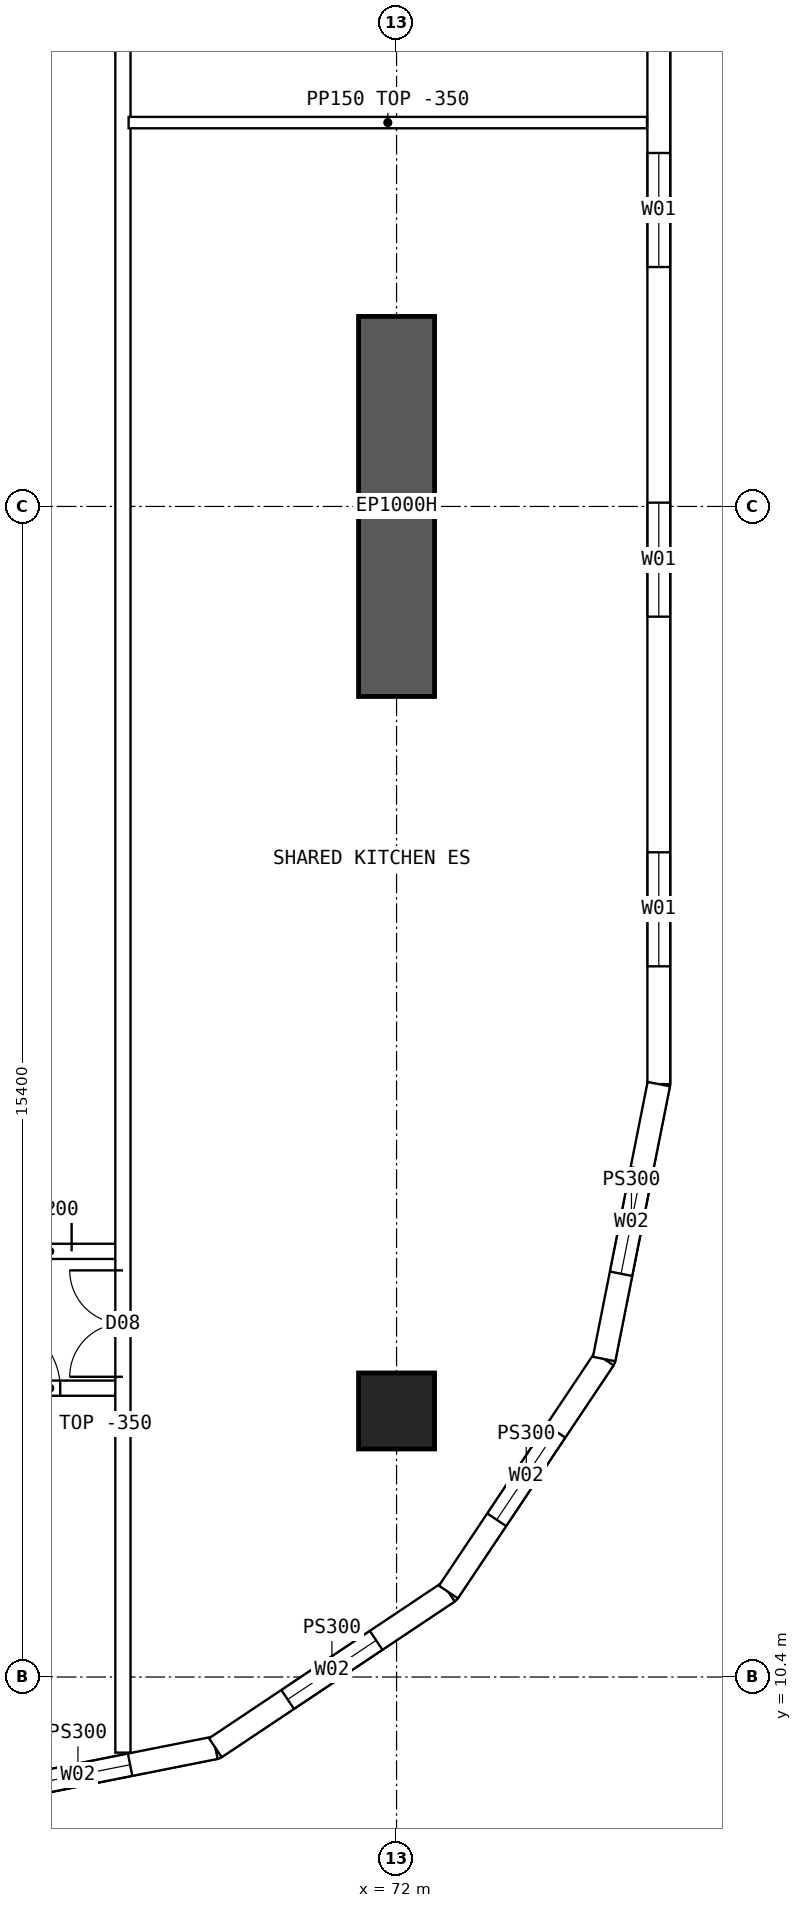
"""IFC4 building model, lengths in metres.
Left out: names, types, materials, properties, quantities, classifications, styles, units other than length and angle.
Written with IfcOpenShell. Run it as: python <this file> out.ifc"""

import sys

from ifc_helpers import new_model, si_unit, direction, frame, frame_2d, origin, origin_2d, place, context, subcontext, project, spatial, polyline, rectangle, hollow_rectangle, outline, extrude, element, fill, save


model = new_model("IFC4")
c1 = context("Model", 3, precision=1e-05, world=origin(), true_north=direction((0.0, 1.0)))
c2 = subcontext(c1, "Body", "Model", "MODEL_VIEW")
j1 = project(units=[si_unit("LENGTHUNIT", "METRE"), si_unit("PLANEANGLEUNIT", "RADIAN")], contexts=[c1])
p1 = place(None, origin())
s1 = spatial("IfcSite", under=j1, at=p1, CompositionType="ELEMENT")
p2 = place(p1, origin())
s2 = spatial("IfcBuilding", under=s1, at=p2, CompositionType="ELEMENT")
p3 = place(p2, frame((0.0, 0.0, 129.4)))
s3 = spatial("IfcBuildingStorey", under=s2, at=p3, CompositionType="ELEMENT", Elevation=129.4)
p4 = place(p3, frame((72.0, 13.9, 0.0), z_axis=(0.0, 0.0, 1.0), x_axis=(1.0, 0.0, 0.0)))
e1 = element("IfcColumn", 1, at=p4, inside=s3, PredefinedType="COLUMN", context=c2, shape_type="SweptSolid", body=[
    extrude(hollow_rectangle(XDim=1.0, YDim=1.0, WallThickness=0.1, at=origin_2d()), origin(), (0.0, 0.0, 1.0), 3.75),
])
p5 = place(p3, frame((72.0, 23.3, 0.0), z_axis=(0.0, 0.0, 1.0), x_axis=(0.0, 1.0, 0.0)))
e2 = element("IfcWall", 2, at=p5, inside=s3, PredefinedType="SHEAR", context=c2, shape_type="SweptSolid", body=[
    extrude(rectangle(XDim=5.0, YDim=1.0, at=frame_2d((2.5, 0.0))), origin(), (0.0, 0.0, 1.0), 3.75),
])
p6 = place(p3, frame((75.45, 18.2, 0.0), z_axis=(0.0, 0.0, 1.0), x_axis=(0.0, 1.0, 0.0)))
e3 = element("IfcWall", 3, at=p6, inside=s3, PredefinedType="SOLIDWALL", context=c2, shape_type="SweptSolid", body=[
    extrude(outline(polyline([(-0.015, -0.15), (27.615, -0.15), (27.585, 0.15), (0.015, 0.15), (-0.015, -0.15)])), origin(), (0.0, 0.0, 1.0), 3.4),
])
p7 = place(p6, frame((1.55, 0.0, 0.9)))
e4 = element("IfcOpeningElement", 4, at=p7, cuts=e3, PredefinedType="OPENING", context=c2, shape_type="SweptSolid", body=[
    extrude(rectangle(XDim=1.5, YDim=2.0, at=frame_2d((0.75, 1.0))), frame((0.0, 0.16, 0.0), z_axis=(0.0, -1.0, 0.0), x_axis=(1.0, 0.0, 0.0)), (0.0, 0.0, 1.0), 0.32),
])
p8 = place(p6, frame((6.15, 0.0, 0.9)))
e5 = element("IfcOpeningElement", 5, at=p8, cuts=e3, PredefinedType="OPENING", context=c2, shape_type="SweptSolid", body=[
    extrude(rectangle(XDim=1.5, YDim=2.0, at=frame_2d((0.75, 1.0))), frame((0.0, 0.16, 0.0), z_axis=(0.0, -1.0, 0.0), x_axis=(1.0, 0.0, 0.0)), (0.0, 0.0, 1.0), 0.32),
])
p9 = place(p6, frame((10.75, 0.0, 0.9)))
e6 = element("IfcOpeningElement", 6, at=p9, cuts=e3, PredefinedType="OPENING", context=c2, shape_type="SweptSolid", body=[
    extrude(rectangle(XDim=1.5, YDim=2.0, at=frame_2d((0.75, 1.0))), frame((0.0, 0.16, 0.0), z_axis=(0.0, -1.0, 0.0), x_axis=(1.0, 0.0, 0.0)), (0.0, 0.0, 1.0), 0.32),
])
p10 = place(p6, frame((15.35, 0.0, 0.9)))
e7 = element("IfcOpeningElement", 7, at=p10, cuts=e3, PredefinedType="OPENING", context=c2, shape_type="SweptSolid", body=[
    extrude(rectangle(XDim=1.5, YDim=2.0, at=frame_2d((0.75, 1.0))), frame((0.0, 0.16, 0.0), z_axis=(0.0, -1.0, 0.0), x_axis=(1.0, 0.0, 0.0)), (0.0, 0.0, 1.0), 0.32),
])
p11 = place(p6, frame((19.95, 0.0, 0.9)))
e8 = element("IfcOpeningElement", 8, at=p11, cuts=e3, PredefinedType="OPENING", context=c2, shape_type="SweptSolid", body=[
    extrude(rectangle(XDim=1.5, YDim=2.0, at=frame_2d((0.75, 1.0))), frame((0.0, 0.16, 0.0), z_axis=(0.0, -1.0, 0.0), x_axis=(1.0, 0.0, 0.0)), (0.0, 0.0, 1.0), 0.32),
])
p12 = place(p6, frame((24.55, 0.0, 0.9)))
e9 = element("IfcOpeningElement", 9, at=p12, cuts=e3, PredefinedType="OPENING", context=c2, shape_type="SweptSolid", body=[
    extrude(rectangle(XDim=1.5, YDim=2.0, at=frame_2d((0.75, 1.0))), frame((0.0, 0.16, 0.0), z_axis=(0.0, -1.0, 0.0), x_axis=(1.0, 0.0, 0.0)), (0.0, 0.0, 1.0), 0.32),
])
p13 = place(p3, frame((66.0, 8.75, 0.0), z_axis=(0.0, 0.0, 1.0), x_axis=(0.980791473772, 0.195059183267, 0.0)))
e10 = element("IfcWall", 10, at=p13, inside=s3, PredefinedType="SOLIDWALL", context=c2, shape_type="SweptSolid", body=[
    extrude(outline(polyline([(-0.03, -0.15), (3.717, -0.15), (3.657, 0.15), (0.03, 0.15), (-0.03, -0.15)])), origin(), (0.0, 0.0, 1.0), 3.4),
])
p14 = place(p13, frame((1.144, 0.0, 0.9)))
e11 = element("IfcOpeningElement", 11, at=p14, cuts=e10, PredefinedType="OPENING", context=c2, shape_type="SweptSolid", body=[
    extrude(rectangle(XDim=1.4, YDim=1.8, at=frame_2d((0.7, 0.9))), frame((0.0, 0.16, 0.0), z_axis=(0.0, -1.0, 0.0), x_axis=(1.0, 0.0, 0.0)), (0.0, 0.0, 1.0), 0.32),
])
p15 = place(p3, frame((69.616, 9.469, 0.0), z_axis=(0.0, 0.0, 1.0), x_axis=(0.831448786846, 0.555601399253, 0.0)))
e12 = element("IfcWall", 12, at=p15, inside=s3, PredefinedType="SOLIDWALL", context=c2, shape_type="SweptSolid", body=[
    extrude(outline(polyline([(-0.03, -0.15), (3.717, -0.15), (3.657, 0.15), (0.03, 0.15), (-0.03, -0.15)])), origin(), (0.0, 0.0, 1.0), 3.4),
])
p16 = place(p15, frame((1.144, 0.0, 0.9)))
e13 = element("IfcOpeningElement", 13, at=p16, cuts=e12, PredefinedType="OPENING", context=c2, shape_type="SweptSolid", body=[
    extrude(rectangle(XDim=1.4, YDim=1.8, at=frame_2d((0.7, 0.9))), frame((0.0, 0.16, 0.0), z_axis=(0.0, -1.0, 0.0), x_axis=(1.0, 0.0, 0.0)), (0.0, 0.0, 1.0), 0.32),
])
p17 = place(p3, frame((72.682, 11.518, 0.0), z_axis=(0.0, 0.0, 1.0), x_axis=(0.555601399253, 0.831448786846, 0.0)))
e14 = element("IfcWall", 14, at=p17, inside=s3, PredefinedType="SOLIDWALL", context=c2, shape_type="SweptSolid", body=[
    extrude(outline(polyline([(-0.03, -0.15), (3.717, -0.15), (3.657, 0.15), (0.03, 0.15), (-0.03, -0.15)])), origin(), (0.0, 0.0, 1.0), 3.4),
])
p18 = place(p17, frame((1.144, 0.0, 0.9)))
e15 = element("IfcOpeningElement", 15, at=p18, cuts=e14, PredefinedType="OPENING", context=c2, shape_type="SweptSolid", body=[
    extrude(rectangle(XDim=1.4, YDim=1.8, at=frame_2d((0.7, 0.9))), frame((0.0, 0.16, 0.0), z_axis=(0.0, -1.0, 0.0), x_axis=(1.0, 0.0, 0.0)), (0.0, 0.0, 1.0), 0.32),
])
p19 = place(p3, frame((74.731, 14.583, 0.0), z_axis=(0.0, 0.0, 1.0), x_axis=(0.195059183267, 0.980791473772, 0.0)))
e16 = element("IfcWall", 16, at=p19, inside=s3, PredefinedType="SOLIDWALL", context=c2, shape_type="SweptSolid", body=[
    extrude(outline(polyline([(-0.03, -0.15), (3.702, -0.15), (3.672, 0.15), (0.03, 0.15), (-0.03, -0.15)])), origin(), (0.0, 0.0, 1.0), 3.4),
])
p20 = place(p19, frame((1.144, 0.0, 0.9)))
e17 = element("IfcOpeningElement", 17, at=p20, cuts=e16, PredefinedType="OPENING", context=c2, shape_type="SweptSolid", body=[
    extrude(rectangle(XDim=1.4, YDim=1.8, at=frame_2d((0.7, 0.9))), frame((0.0, 0.16, 0.0), z_axis=(0.0, -1.0, 0.0), x_axis=(1.0, 0.0, 0.0)), (0.0, 0.0, 1.0), 0.32),
])
p21 = place(p3, frame((66.475, 14.2, 0.0), z_axis=(0.0, 0.0, 1.0), x_axis=(1.0, 0.0, 0.0)))
e18 = element("IfcWall", 18, at=p21, inside=s3, PredefinedType="SOLIDWALL", context=c2, shape_type="SweptSolid", body=[
    extrude(rectangle(XDim=1.925, YDim=0.2, at=frame_2d((0.962, 0.0))), origin(), (0.0, 0.0, 1.0), 3.4),
])
p22 = place(p21, frame((0.2, 0.0, 0.0)))
e19 = element("IfcOpeningElement", 19, at=p22, cuts=e18, PredefinedType="OPENING", context=c2, shape_type="SweptSolid", body=[
    extrude(rectangle(XDim=0.9, YDim=2.1, at=frame_2d((0.45, 1.05))), frame((0.0, 0.11, 0.0), z_axis=(0.0, -1.0, 0.0), x_axis=(1.0, 0.0, 0.0)), (0.0, 0.0, 1.0), 0.22),
])
p23 = place(p3, frame((66.475, 16.0, 0.0), z_axis=(0.0, 0.0, 1.0), x_axis=(1.0, 0.0, 0.0)))
e20 = element("IfcWall", 20, at=p23, inside=s3, PredefinedType="SOLIDWALL", context=c2, shape_type="SweptSolid", body=[
    extrude(rectangle(XDim=1.925, YDim=0.2, at=frame_2d((0.962, 0.0))), origin(), (0.0, 0.0, 1.0), 3.4),
])
p24 = place(p23, frame((0.05, 0.0, 0.0)))
e21 = element("IfcOpeningElement", 21, at=p24, cuts=e20, PredefinedType="OPENING", context=c2, shape_type="SweptSolid", body=[
    extrude(rectangle(XDim=1.2, YDim=2.1, at=frame_2d((0.6, 1.05))), frame((0.0, 0.11, 0.0), z_axis=(0.0, -1.0, 0.0), x_axis=(1.0, 0.0, 0.0)), (0.0, 0.0, 1.0), 0.22),
])
p25 = place(p3, frame((68.475, 30.85, 0.0), z_axis=(0.0, 0.0, 1.0), x_axis=(1.0, 0.0, 0.0)))
e22 = element("IfcWall", 22, at=p25, inside=s3, PredefinedType="PARTITIONING", context=c2, shape_type="SweptSolid", body=[
    extrude(outline(polyline([(0.0, 0.0), (6.82, 0.0), (6.82, 3.4), (3.827, 3.4), (3.825, 2.95), (3.227, 2.95), (3.225, 3.4), (0.0, 3.4), (0.0, 0.0)])), frame((0.0, 0.075, 0.0), z_axis=(0.0, -1.0, 0.0), x_axis=(1.0, 0.0, 0.0)), (0.0, 0.0, 1.0), 0.15),
])
p26 = place(p3, frame((68.4, 9.405, 0.0), z_axis=(0.0, 0.0, 1.0), x_axis=(0.0, 1.0, 0.0)))
e23 = element("IfcWall", 23, at=p26, inside=s3, PredefinedType="SOLIDWALL", context=c2, shape_type="SweptSolid", body=[
    extrude(rectangle(XDim=45.189, YDim=0.2, at=frame_2d((22.595, 0.0))), origin(), (0.0, 0.0, 1.0), 3.4),
])
p27 = place(p26, frame((4.945, 0.0, 0.0)))
e24 = element("IfcOpeningElement", 24, at=p27, cuts=e23, PredefinedType="OPENING", context=c2, shape_type="SweptSolid", body=[
    extrude(rectangle(XDim=1.4, YDim=2.1, at=frame_2d((0.7, 1.05))), frame((0.0, 0.11, 0.0), z_axis=(0.0, -1.0, 0.0), x_axis=(1.0, 0.0, 0.0)), (0.0, 0.0, 1.0), 0.22),
])
p28 = place(p26, frame((38.745, 0.0, 0.0)))
e25 = element("IfcOpeningElement", 25, at=p28, cuts=e23, PredefinedType="OPENING", context=c2, shape_type="SweptSolid", body=[
    extrude(rectangle(XDim=1.4, YDim=2.1, at=frame_2d((0.7, 1.05))), frame((0.0, 0.11, 0.0), z_axis=(0.0, -1.0, 0.0), x_axis=(1.0, 0.0, 0.0)), (0.0, 0.0, 1.0), 0.22),
])
p29 = place(p7, origin())
e26 = element("IfcWindow", 26, at=p29, inside=s3, PartitioningType="SINGLE_PANEL", PredefinedType="WINDOW", context=c2, shape_type="SweptSolid", body=[
    extrude(rectangle(XDim=1.5, YDim=2.0, at=frame_2d((0.75, 1.0))), frame((0.0, 0.03, 0.0), z_axis=(0.0, -1.0, 0.0), x_axis=(1.0, 0.0, 0.0)), (0.0, 0.0, 1.0), 0.06),
])
fill(e4, e26)
p30 = place(p8, origin())
e27 = element("IfcWindow", 27, at=p30, inside=s3, PartitioningType="SINGLE_PANEL", PredefinedType="WINDOW", context=c2, shape_type="SweptSolid", body=[
    extrude(rectangle(XDim=1.5, YDim=2.0, at=frame_2d((0.75, 1.0))), frame((0.0, 0.03, 0.0), z_axis=(0.0, -1.0, 0.0), x_axis=(1.0, 0.0, 0.0)), (0.0, 0.0, 1.0), 0.06),
])
fill(e5, e27)
p31 = place(p9, origin())
e28 = element("IfcWindow", 28, at=p31, inside=s3, PartitioningType="SINGLE_PANEL", PredefinedType="WINDOW", context=c2, shape_type="SweptSolid", body=[
    extrude(rectangle(XDim=1.5, YDim=2.0, at=frame_2d((0.75, 1.0))), frame((0.0, 0.03, 0.0), z_axis=(0.0, -1.0, 0.0), x_axis=(1.0, 0.0, 0.0)), (0.0, 0.0, 1.0), 0.06),
])
fill(e6, e28)
p32 = place(p14, origin())
e29 = element("IfcWindow", 29, at=p32, inside=s3, PartitioningType="SINGLE_PANEL", PredefinedType="WINDOW", context=c2, shape_type="SweptSolid", body=[
    extrude(rectangle(XDim=1.4, YDim=1.8, at=frame_2d((0.7, 0.9))), frame((0.0, 0.03, 0.0), z_axis=(0.0, -1.0, 0.0), x_axis=(1.0, 0.0, 0.0)), (0.0, 0.0, 1.0), 0.06),
])
fill(e11, e29)
p33 = place(p16, origin())
e30 = element("IfcWindow", 30, at=p33, inside=s3, PartitioningType="SINGLE_PANEL", PredefinedType="WINDOW", context=c2, shape_type="SweptSolid", body=[
    extrude(rectangle(XDim=1.4, YDim=1.8, at=frame_2d((0.7, 0.9))), frame((0.0, 0.03, 0.0), z_axis=(0.0, -1.0, 0.0), x_axis=(1.0, 0.0, 0.0)), (0.0, 0.0, 1.0), 0.06),
])
fill(e13, e30)
p34 = place(p18, origin())
e31 = element("IfcWindow", 31, at=p34, inside=s3, PartitioningType="SINGLE_PANEL", PredefinedType="WINDOW", context=c2, shape_type="SweptSolid", body=[
    extrude(rectangle(XDim=1.4, YDim=1.8, at=frame_2d((0.7, 0.9))), frame((0.0, 0.03, 0.0), z_axis=(0.0, -1.0, 0.0), x_axis=(1.0, 0.0, 0.0)), (0.0, 0.0, 1.0), 0.06),
])
fill(e15, e31)
p35 = place(p20, origin())
e32 = element("IfcWindow", 32, at=p35, inside=s3, PartitioningType="SINGLE_PANEL", PredefinedType="WINDOW", context=c2, shape_type="SweptSolid", body=[
    extrude(rectangle(XDim=1.4, YDim=1.8, at=frame_2d((0.7, 0.9))), frame((0.0, 0.03, 0.0), z_axis=(0.0, -1.0, 0.0), x_axis=(1.0, 0.0, 0.0)), (0.0, 0.0, 1.0), 0.06),
])
fill(e17, e32)
p36 = place(p24, origin())
e33 = element("IfcDoor", 33, at=p36, inside=s3, OperationType="DOUBLE_DOOR_SINGLE_SWING", PredefinedType="DOOR", context=c2, shape_type="SweptSolid", body=[
    extrude(rectangle(XDim=1.2, YDim=2.1, at=frame_2d((0.6, 1.05))), frame((0.0, 0.025, 0.0), z_axis=(0.0, -1.0, 0.0), x_axis=(1.0, 0.0, 0.0)), (0.0, 0.0, 1.0), 0.05),
])
fill(e21, e33)
p37 = place(p27, origin())
e34 = element("IfcDoor", 34, at=p37, inside=s3, OperationType="DOUBLE_DOOR_SINGLE_SWING", PredefinedType="DOOR", context=c2, shape_type="SweptSolid", body=[
    extrude(rectangle(XDim=1.4, YDim=2.1, at=frame_2d((0.7, 1.05))), frame((0.0, 0.025, 0.0), z_axis=(0.0, -1.0, 0.0), x_axis=(1.0, 0.0, 0.0)), (0.0, 0.0, 1.0), 0.05),
])
fill(e24, e34)
p38 = place(p22, origin())
e35 = element("IfcDoor", 35, at=p38, inside=s3, OperationType="SINGLE_SWING_LEFT", PredefinedType="DOOR", context=c2, shape_type="SweptSolid", body=[
    extrude(rectangle(XDim=0.9, YDim=2.1, at=frame_2d((0.45, 1.05))), frame((0.0, 0.025, 0.0), z_axis=(0.0, -1.0, 0.0), x_axis=(1.0, 0.0, 0.0)), (0.0, 0.0, 1.0), 0.05),
])
fill(e19, e35)
save(model, sys.argv[1])
